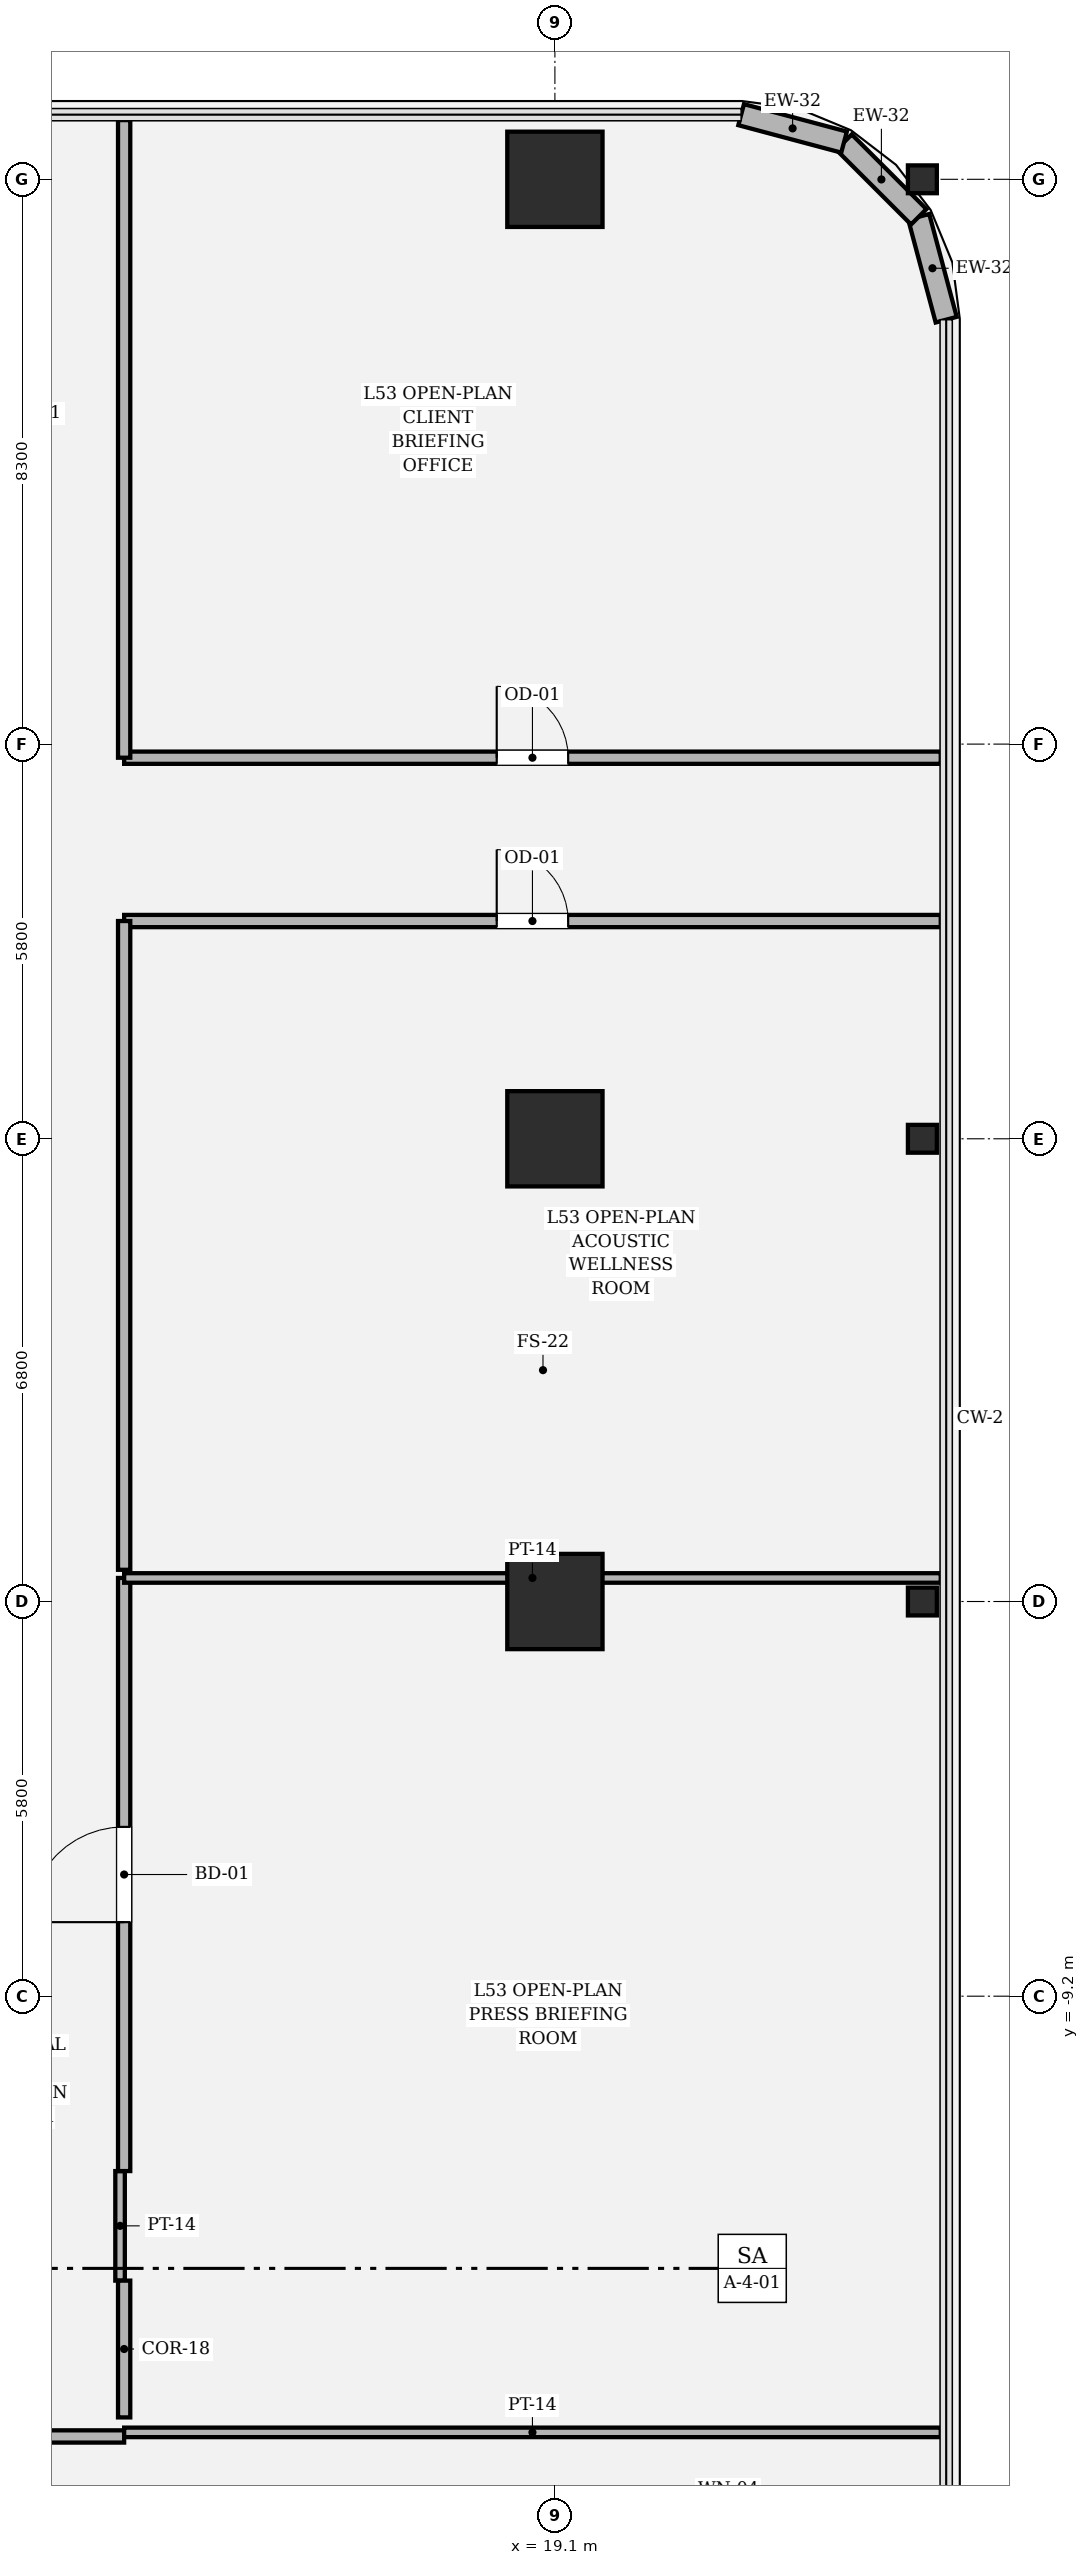
"""IFC4 building model, lengths in metres.
Left out: names, types, materials, properties, quantities, classifications, styles, units other than length and angle.
Written with IfcOpenShell. Run it as: python <this file> out.ifc"""

import sys

from ifc_helpers import new_model, si_unit, direction, frame, frame_2d, origin, origin_2d, place, context, subcontext, project, spatial, rectangle, hollow_rectangle, i_section, extrude, element, fill, save


model = new_model("IFC4")
c1 = context("Model", 3, precision=1e-05, world=origin(), true_north=direction((0.0, 1.0)))
c2 = subcontext(c1, "Body", "Model", "MODEL_VIEW")
j1 = project(units=[si_unit("LENGTHUNIT", "METRE"), si_unit("PLANEANGLEUNIT", "RADIAN")], contexts=[c1])
p1 = place(None, origin())
s1 = spatial("IfcSite", under=j1, at=p1, CompositionType="ELEMENT")
p2 = place(p1, origin())
s2 = spatial("IfcBuilding", under=s1, at=p2, CompositionType="ELEMENT")
p3 = place(p2, frame((0.0, 0.0, 224.85)))
s3 = spatial("IfcBuildingStorey", under=s2, at=p3, CompositionType="ELEMENT", Elevation=224.85)
for number, where, z_axis, x_axis in (
    (1, (19.1, -3.4, 0.0), (0.0, 0.0, 1.0), (1.0, 0.0, 0.0)),
    (2, (19.1, 3.4, 0.0), (0.0, 0.0, 1.0), (1.0, 0.0, 0.0)),
    (3, (19.1, 17.5, 0.0), (0.0, 0.0, 1.0), (1.0, 0.0, 0.0)),
):
    element("IfcColumn", number, at=place(p3, frame(where, z_axis=z_axis, x_axis=x_axis)), inside=s3, PredefinedType="COLUMN", context=c2, shape_type="SweptSolid", body=[
        extrude(hollow_rectangle(XDim=1.4, YDim=1.4, WallThickness=0.042, at=origin_2d()), origin(), (0.0, 0.0, 1.0), 4.05),
    ])
for number, where, z_axis, x_axis in (
    (4, (24.5, -3.4, 0.0), (0.0, 0.0, 1.0), (0.0, 1.0, 0.0)),
    (5, (24.5, 3.4, 0.0), (0.0, 0.0, 1.0), (0.0, 1.0, 0.0)),
    (6, (24.5, 17.5, 0.0), (0.0, 0.0, 1.0), (0.0, 1.0, 0.0)),
):
    element("IfcColumn", number, at=place(p3, frame(where, z_axis=z_axis, x_axis=x_axis)), inside=s3, PredefinedType="COLUMN", context=c2, shape_type="SweptSolid", body=[
        extrude(i_section(OverallWidth=0.409, OverallDepth=0.425, WebThickness=0.032, FlangeThickness=0.052, FilletRadius=0.018, at=origin_2d()), origin(), (0.0, 0.0, 1.0), 4.048),
    ])
p4 = place(p3, frame((24.85, 15.437, 0.0), z_axis=(0.0, 0.0, 1.0), x_axis=(-0.257847112249, 0.966185730957, 0.0)))
e7 = element("IfcWall", 7, at=p4, inside=s3, PredefinedType="SOLIDWALL", context=c2, shape_type="SweptSolid", body=[
    extrude(rectangle(XDim=1.565, YDim=0.32, at=frame_2d((0.783, 0.0))), origin(), (0.0, 0.0, 1.0), 2.544),
])
p5 = place(p3, frame((24.447, 16.949, 0.0), z_axis=(0.0, 0.0, 1.0), x_axis=(-0.707106781187, 0.707106781187, 0.0)))
e8 = element("IfcWall", 8, at=p5, inside=s3, PredefinedType="SOLIDWALL", context=c2, shape_type="SweptSolid", body=[
    extrude(rectangle(XDim=1.552, YDim=0.32, at=frame_2d((0.776, 0.0))), origin(), (0.0, 0.0, 1.0), 2.504),
])
p6 = place(p3, frame((23.349, 18.047, 0.0), z_axis=(0.0, 0.0, 1.0), x_axis=(-0.966224582397, 0.257701486942, 0.0)))
e9 = element("IfcWall", 9, at=p6, inside=s3, PredefinedType="SOLIDWALL", context=c2, shape_type="SweptSolid", body=[
    extrude(rectangle(XDim=1.565, YDim=0.32, at=frame_2d((0.783, 0.0))), origin(), (0.0, 0.0, 1.0), 3.83),
])
p7 = place(p3, frame((-7.726, -15.67, 0.0), z_axis=(0.0, 0.0, 1.0), x_axis=(1.0, 0.0, 0.0)))
e10 = element("IfcWall", 10, at=p7, inside=s3, PredefinedType="PARTITIONING", context=c2, shape_type="SweptSolid", body=[
    extrude(rectangle(XDim=20.496, YDim=0.18, at=frame_2d((10.248, 0.0))), origin(), (0.0, 0.0, 1.0), 3.174),
])
p8 = place(p7, frame((9.098, 0.0, 0.0)))
e11 = element("IfcOpeningElement", 11, at=p8, cuts=e10, PredefinedType="OPENING", context=c2, shape_type="SweptSolid", body=[
    extrude(rectangle(XDim=1.4, YDim=2.25, at=frame_2d((0.7, 1.125))), frame((0.0, 0.1, 0.0), z_axis=(0.0, -1.0, 0.0), x_axis=(1.0, 0.0, 0.0)), (0.0, 0.0, 1.0), 0.2),
])
p9 = place(p3, frame((12.77, -15.61, 0.0), z_axis=(0.0, 0.0, 1.0), x_axis=(1.0, 0.0, 0.0)))
e12 = element("IfcWall", 12, at=p9, inside=s3, PredefinedType="PARTITIONING", context=c2, shape_type="SweptSolid", body=[
    extrude(rectangle(XDim=12.0, YDim=0.14, at=frame_2d((6.0, 0.0))), origin(), (0.0, 0.0, 1.0), 3.174),
])
p10 = place(p3, frame((12.71, -13.38, 0.0), z_axis=(0.0, 0.0, 1.0), x_axis=(0.0, 1.0, 0.0)))
e13 = element("IfcWall", 13, at=p10, inside=s3, PredefinedType="PARTITIONING", context=c2, shape_type="SweptSolid", body=[
    extrude(rectangle(XDim=1.61, YDim=0.14, at=frame_2d((0.805, 0.0))), origin(), (0.0, 0.0, 1.0), 3.424),
])
p11 = place(p3, frame((12.77, -11.77, 0.0), z_axis=(0.0, 0.0, 1.0), x_axis=(0.0, 1.0, 0.0)))
e14 = element("IfcWall", 14, at=p11, inside=s3, PredefinedType="PARTITIONING", context=c2, shape_type="SweptSolid", body=[
    extrude(rectangle(XDim=8.716, YDim=0.18, at=frame_2d((4.358, 0.0))), origin(), (0.0, 0.0, 1.0), 3.174),
])
p12 = place(p11, frame((3.658, 0.0, 0.0)))
e15 = element("IfcOpeningElement", 15, at=p12, cuts=e14, PredefinedType="OPENING", context=c2, shape_type="SweptSolid", body=[
    extrude(rectangle(XDim=1.4, YDim=2.25, at=frame_2d((0.7, 1.125))), frame((0.0, 0.1, 0.0), z_axis=(0.0, -1.0, 0.0), x_axis=(1.0, 0.0, 0.0)), (0.0, 0.0, 1.0), 0.2),
])
p13 = place(p3, frame((12.77, -3.054, 0.0), z_axis=(0.0, 0.0, 1.0), x_axis=(1.0, 0.0, 0.0)))
e16 = element("IfcWall", 16, at=p13, inside=s3, PredefinedType="PARTITIONING", context=c2, shape_type="SweptSolid", body=[
    extrude(rectangle(XDim=12.0, YDim=0.14, at=frame_2d((6.0, 0.0))), origin(), (0.0, 0.0, 1.0), 2.504),
])
p14 = place(p3, frame((12.77, -15.39, 0.0), z_axis=(0.0, 0.0, 1.0), x_axis=(0.0, 1.0, 0.0)))
e17 = element("IfcWall", 17, at=p14, inside=s3, PredefinedType="PARTITIONING", context=c2, shape_type="SweptSolid", body=[
    extrude(rectangle(XDim=2.01, YDim=0.18, at=frame_2d((1.005, 0.0))), origin(), (0.0, 0.0, 1.0), 3.424),
])
p15 = place(p3, frame((12.77, 6.6, 0.0), z_axis=(0.0, 0.0, 1.0), x_axis=(1.0, 0.0, 0.0)))
e18 = element("IfcWall", 18, at=p15, inside=s3, PredefinedType="PARTITIONING", context=c2, shape_type="SweptSolid", body=[
    extrude(rectangle(XDim=12.0, YDim=0.18, at=frame_2d((6.0, 0.0))), origin(), (0.0, 0.0, 1.0), 2.544),
])
p16 = place(p15, frame((5.475, 0.0, 0.0)))
e19 = element("IfcOpeningElement", 19, at=p16, cuts=e18, PredefinedType="OPENING", context=c2, shape_type="SweptSolid", body=[
    extrude(rectangle(XDim=1.05, YDim=2.2, at=frame_2d((0.525, 1.1))), frame((0.0, 0.1, 0.0), z_axis=(0.0, -1.0, 0.0), x_axis=(1.0, 0.0, 0.0)), (0.0, 0.0, 1.0), 0.2),
])
p17 = place(p3, frame((12.77, -2.934, 0.0), z_axis=(0.0, 0.0, 1.0), x_axis=(0.0, 1.0, 0.0)))
e20 = element("IfcWall", 20, at=p17, inside=s3, PredefinedType="PARTITIONING", context=c2, shape_type="SweptSolid", body=[
    extrude(rectangle(XDim=9.534, YDim=0.18, at=frame_2d((4.767, 0.0))), origin(), (0.0, 0.0, 1.0), 3.174),
])
p18 = place(p3, frame((24.77, 9.0, 0.0), z_axis=(0.0, 0.0, 1.0), x_axis=(-1.0, 0.0, 0.0)))
e21 = element("IfcWall", 21, at=p18, inside=s3, PredefinedType="PARTITIONING", context=c2, shape_type="SweptSolid", body=[
    extrude(rectangle(XDim=12.0, YDim=0.18, at=frame_2d((6.0, 0.0))), origin(), (0.0, 0.0, 1.0), 2.544),
])
p19 = place(p18, frame((5.475, 0.0, 0.0)))
e22 = element("IfcOpeningElement", 22, at=p19, cuts=e21, PredefinedType="OPENING", context=c2, shape_type="SweptSolid", body=[
    extrude(rectangle(XDim=1.05, YDim=2.2, at=frame_2d((0.525, 1.1))), frame((0.0, 0.1, 0.0), z_axis=(0.0, -1.0, 0.0), x_axis=(1.0, 0.0, 0.0)), (0.0, 0.0, 1.0), 0.2),
])
p20 = place(p3, frame((12.77, 9.0, 0.0), z_axis=(0.0, 0.0, 1.0), x_axis=(0.0, 1.0, 0.0)))
e23 = element("IfcWall", 23, at=p20, inside=s3, PredefinedType="PARTITIONING", context=c2, shape_type="SweptSolid", body=[
    extrude(rectangle(XDim=9.37, YDim=0.18, at=frame_2d((4.685, 0.0))), origin(), (0.0, 0.0, 1.0), 3.174),
])
p21 = place(p12, origin())
e24 = element("IfcDoor", 24, at=p21, inside=s3, OperationType="SINGLE_SWING_LEFT", PredefinedType="DOOR", context=c2, shape_type="SweptSolid", body=[
    extrude(rectangle(XDim=1.4, YDim=2.25, at=frame_2d((0.7, 1.125))), frame((0.0, 0.025, 0.0), z_axis=(0.0, -1.0, 0.0), x_axis=(1.0, 0.0, 0.0)), (0.0, 0.0, 1.0), 0.05),
])
fill(e15, e24)
p22 = place(p16, origin())
e25 = element("IfcDoor", 25, at=p22, inside=s3, OperationType="SINGLE_SWING_LEFT", PredefinedType="DOOR", context=c2, shape_type="SweptSolid", body=[
    extrude(rectangle(XDim=1.05, YDim=2.2, at=frame_2d((0.525, 1.1))), frame((0.0, 0.025, 0.0), z_axis=(0.0, -1.0, 0.0), x_axis=(1.0, 0.0, 0.0)), (0.0, 0.0, 1.0), 0.05),
])
fill(e19, e25)
p23 = place(p19, origin())
e26 = element("IfcDoor", 26, at=p23, inside=s3, OperationType="SINGLE_SWING_RIGHT", PredefinedType="DOOR", context=c2, shape_type="SweptSolid", body=[
    extrude(rectangle(XDim=1.05, YDim=2.2, at=frame_2d((0.525, 1.1))), frame((0.0, 0.025, 0.0), z_axis=(0.0, -1.0, 0.0), x_axis=(1.0, 0.0, 0.0)), (0.0, 0.0, 1.0), 0.05),
])
fill(e22, e26)
save(model, sys.argv[1])
